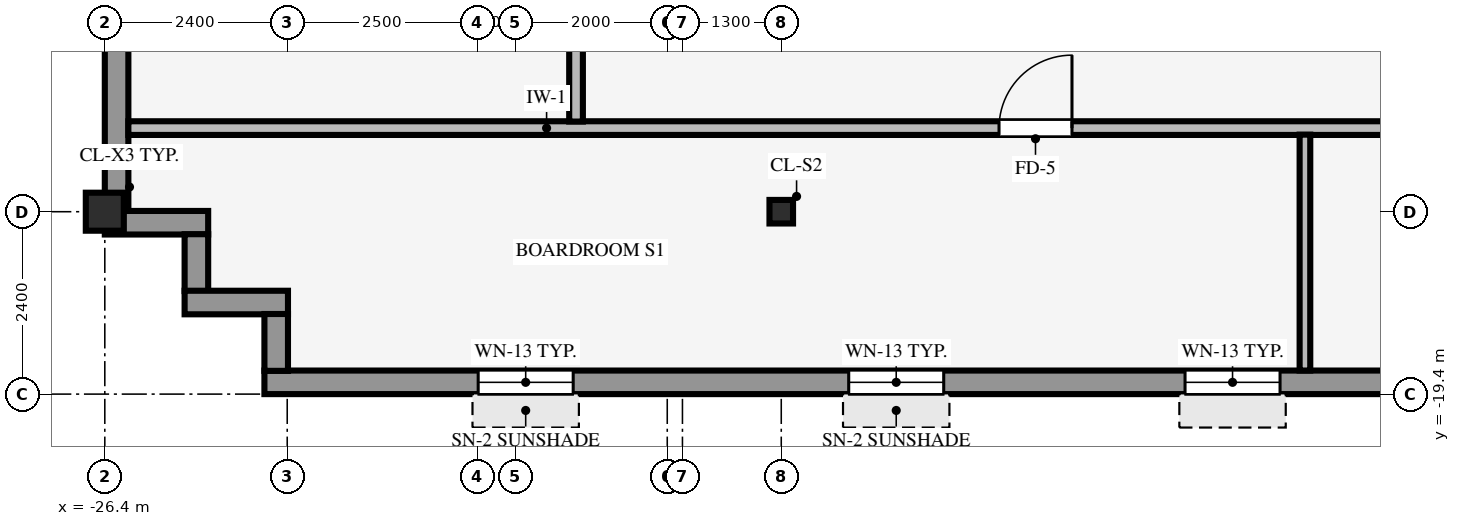
"""IFC4 building model, lengths in metres.
Left out: names, types, materials, properties, quantities, classifications, styles, units other than length and angle.
Written with IfcOpenShell. Run it as: python <this file> out.ifc"""

import sys

from ifc_helpers import new_model, si_unit, direction, frame, frame_2d, origin, origin_2d, place, context, subcontext, project, spatial, rectangle, hollow_rectangle, i_section, extrude, source, transform, mapped, element, fill, save


model = new_model("IFC4")
c1 = context("Model", 3, precision=1e-05, world=origin(), true_north=direction((0.0, 1.0)))
c2 = subcontext(c1, "Body", "Model", "MODEL_VIEW")
j1 = project(units=[si_unit("LENGTHUNIT", "METRE"), si_unit("PLANEANGLEUNIT", "RADIAN")], contexts=[c1])
p1 = place(None, origin())
s1 = spatial("IfcSite", under=j1, at=p1, CompositionType="ELEMENT")
p2 = place(p1, origin())
s2 = spatial("IfcBuilding", under=s1, at=p2, CompositionType="ELEMENT")
p3 = place(p2, frame((0.0, 0.0, 216.45)))
s3 = spatial("IfcBuildingStorey", under=s2, at=p3, CompositionType="ELEMENT", Elevation=216.45)
p4 = place(p3, frame((-26.4, -17.0, 0.0), z_axis=(0.0, 0.0, 1.0), x_axis=(1.0, 0.0, 0.0)))
e1 = element("IfcColumn", 1, at=p4, inside=s3, PredefinedType="COLUMN", context=c2, shape_type="SweptSolid", body=[
    extrude(hollow_rectangle(XDim=0.5, YDim=0.5, WallThickness=0.032, InnerFilletRadius=0.032, OuterFilletRadius=0.064, at=origin_2d()), origin(), (0.0, 0.0, 1.0), 3.37),
])
p5 = place(p3, frame((-17.5, -17.0, 0.0), z_axis=(0.0, 0.0, 1.0), x_axis=(1.0, 0.0, 0.0)))
e2 = element("IfcColumn", 2, at=p5, inside=s3, PredefinedType="COLUMN", context=c2, shape_type="SweptSolid", body=[
    extrude(i_section(OverallWidth=0.31, OverallDepth=0.31, WebThickness=0.015, FlangeThickness=0.015, FilletRadius=0.015, at=origin_2d()), origin(), (0.0, 0.0, 1.0), 3.37),
])
p6 = place(p3, frame((-24.3, -19.245, 0.0), z_axis=(0.0, 0.0, 1.0), x_axis=(1.0, 0.0, 0.0)))
e3 = element("IfcWall", 3, at=p6, inside=s3, PredefinedType="STANDARD", context=c2, shape_type="SweptSolid", body=[
    extrude(rectangle(XDim=41.0, YDim=0.31, at=frame_2d((20.5, 0.0))), origin(), (0.0, 0.0, 1.0), 2.705),
])
p7 = place(p6, frame((2.812, 0.0, 0.8)))
e4 = element("IfcOpeningElement", 4, at=p7, cuts=e3, PredefinedType="OPENING", context=c2, shape_type="SweptSolid", body=[
    extrude(rectangle(XDim=1.25, YDim=1.52, at=frame_2d((0.625, 0.76))), frame((0.0, 0.165, 0.0), z_axis=(0.0, -1.0, 0.0), x_axis=(1.0, 0.0, 0.0)), (0.0, 0.0, 1.0), 0.33),
])
p8 = place(p6, frame((7.688, 0.0, 0.8)))
e5 = element("IfcOpeningElement", 5, at=p8, cuts=e3, PredefinedType="OPENING", context=c2, shape_type="SweptSolid", body=[
    extrude(rectangle(XDim=1.25, YDim=1.52, at=frame_2d((0.625, 0.76))), frame((0.0, 0.165, 0.0), z_axis=(0.0, -1.0, 0.0), x_axis=(1.0, 0.0, 0.0)), (0.0, 0.0, 1.0), 0.33),
])
p9 = place(p6, frame((12.113, 0.0, 0.8)))
e6 = element("IfcOpeningElement", 6, at=p9, cuts=e3, PredefinedType="OPENING", context=c2, shape_type="SweptSolid", body=[
    extrude(rectangle(XDim=1.25, YDim=1.52, at=frame_2d((0.625, 0.76))), frame((0.0, 0.165, 0.0), z_axis=(0.0, -1.0, 0.0), x_axis=(1.0, 0.0, 0.0)), (0.0, 0.0, 1.0), 0.33),
])
p10 = place(p6, frame((17.438, 0.0, 0.8)))
e7 = element("IfcOpeningElement", 7, at=p10, cuts=e3, PredefinedType="OPENING", context=c2, shape_type="SweptSolid", body=[
    extrude(rectangle(XDim=1.25, YDim=1.52, at=frame_2d((0.625, 0.76))), frame((0.0, 0.165, 0.0), z_axis=(0.0, -1.0, 0.0), x_axis=(1.0, 0.0, 0.0)), (0.0, 0.0, 1.0), 0.33),
])
p11 = place(p6, frame((22.312, 0.0, 0.8)))
e8 = element("IfcOpeningElement", 8, at=p11, cuts=e3, PredefinedType="OPENING", context=c2, shape_type="SweptSolid", body=[
    extrude(rectangle(XDim=1.25, YDim=1.52, at=frame_2d((0.625, 0.76))), frame((0.0, 0.165, 0.0), z_axis=(0.0, -1.0, 0.0), x_axis=(1.0, 0.0, 0.0)), (0.0, 0.0, 1.0), 0.33),
])
p12 = place(p6, frame((27.188, 0.0, 0.8)))
e9 = element("IfcOpeningElement", 9, at=p12, cuts=e3, PredefinedType="OPENING", context=c2, shape_type="SweptSolid", body=[
    extrude(rectangle(XDim=1.25, YDim=1.52, at=frame_2d((0.625, 0.76))), frame((0.0, 0.165, 0.0), z_axis=(0.0, -1.0, 0.0), x_axis=(1.0, 0.0, 0.0)), (0.0, 0.0, 1.0), 0.33),
])
p13 = place(p6, frame((31.163, 0.0, 0.8)))
e10 = element("IfcOpeningElement", 10, at=p13, cuts=e3, PredefinedType="OPENING", context=c2, shape_type="SweptSolid", body=[
    extrude(rectangle(XDim=1.25, YDim=1.52, at=frame_2d((0.625, 0.76))), frame((0.0, 0.165, 0.0), z_axis=(0.0, -1.0, 0.0), x_axis=(1.0, 0.0, 0.0)), (0.0, 0.0, 1.0), 0.33),
])
p14 = place(p6, frame((36.938, 0.0, 0.8)))
e11 = element("IfcOpeningElement", 11, at=p14, cuts=e3, PredefinedType="OPENING", context=c2, shape_type="SweptSolid", body=[
    extrude(rectangle(XDim=1.25, YDim=1.52, at=frame_2d((0.625, 0.76))), frame((0.0, 0.165, 0.0), z_axis=(0.0, -1.0, 0.0), x_axis=(1.0, 0.0, 0.0)), (0.0, 0.0, 1.0), 0.33),
])
p15 = place(p3, frame((-26.245, -16.994, 0.0), z_axis=(0.0, 0.0, 1.0), x_axis=(0.0, 1.0, 0.0)))
e12 = element("IfcWall", 12, at=p15, inside=s3, PredefinedType="STANDARD", context=c2, shape_type="SweptSolid", body=[
    extrude(rectangle(XDim=33.988, YDim=0.31, at=frame_2d((16.994, 0.0))), origin(), (0.0, 0.0, 1.0), 2.705),
])
p16 = place(p15, frame((2.26, 0.0, 0.8)))
e13 = element("IfcOpeningElement", 13, at=p16, cuts=e12, PredefinedType="OPENING", context=c2, shape_type="SweptSolid", body=[
    extrude(rectangle(XDim=2.05, YDim=1.52, at=frame_2d((1.025, 0.76))), frame((0.0, 0.165, 0.0), z_axis=(0.0, -1.0, 0.0), x_axis=(1.0, 0.0, 0.0)), (0.0, 0.0, 1.0), 0.33),
])
p17 = place(p15, frame((8.18, 0.0, 0.8)))
e14 = element("IfcOpeningElement", 14, at=p17, cuts=e12, PredefinedType="OPENING", context=c2, shape_type="SweptSolid", body=[
    extrude(rectangle(XDim=2.05, YDim=1.52, at=frame_2d((1.025, 0.76))), frame((0.0, 0.165, 0.0), z_axis=(0.0, -1.0, 0.0), x_axis=(1.0, 0.0, 0.0)), (0.0, 0.0, 1.0), 0.33),
])
p18 = place(p15, frame((10.949, 0.0, 0.8)))
e15 = element("IfcOpeningElement", 15, at=p18, cuts=e12, PredefinedType="OPENING", context=c2, shape_type="SweptSolid", body=[
    extrude(rectangle(XDim=2.05, YDim=1.52, at=frame_2d((1.025, 0.76))), frame((0.0, 0.165, 0.0), z_axis=(0.0, -1.0, 0.0), x_axis=(1.0, 0.0, 0.0)), (0.0, 0.0, 1.0), 0.33),
])
p19 = place(p15, frame((20.539, 0.0, 0.8)))
e16 = element("IfcOpeningElement", 16, at=p19, cuts=e12, PredefinedType="OPENING", context=c2, shape_type="SweptSolid", body=[
    extrude(rectangle(XDim=2.05, YDim=1.52, at=frame_2d((1.025, 0.76))), frame((0.0, 0.165, 0.0), z_axis=(0.0, -1.0, 0.0), x_axis=(1.0, 0.0, 0.0)), (0.0, 0.0, 1.0), 0.33),
])
p20 = place(p15, frame((23.758, 0.0, 0.8)))
e17 = element("IfcOpeningElement", 17, at=p20, cuts=e12, PredefinedType="OPENING", context=c2, shape_type="SweptSolid", body=[
    extrude(rectangle(XDim=2.05, YDim=1.52, at=frame_2d((1.025, 0.76))), frame((0.0, 0.165, 0.0), z_axis=(0.0, -1.0, 0.0), x_axis=(1.0, 0.0, 0.0)), (0.0, 0.0, 1.0), 0.33),
])
p21 = place(p15, frame((29.678, 0.0, 0.8)))
e18 = element("IfcOpeningElement", 18, at=p21, cuts=e12, PredefinedType="OPENING", context=c2, shape_type="SweptSolid", body=[
    extrude(rectangle(XDim=2.05, YDim=1.52, at=frame_2d((1.025, 0.76))), frame((0.0, 0.165, 0.0), z_axis=(0.0, -1.0, 0.0), x_axis=(1.0, 0.0, 0.0)), (0.0, 0.0, 1.0), 0.33),
])
p22 = place(p3, frame((-26.4, -17.145, 0.0), z_axis=(0.0, 0.0, 1.0), x_axis=(1.0, 0.0, 0.0)))
e19 = element("IfcWall", 19, at=p22, inside=s3, PredefinedType="STANDARD", context=c2, shape_type="SweptSolid", body=[
    extrude(rectangle(XDim=1.36, YDim=0.31, at=frame_2d((0.68, 0.0))), origin(), (0.0, 0.0, 1.0), 2.816),
])
p23 = place(p3, frame((-25.195, -18.044, 0.0), z_axis=(0.0, 0.0, 1.0), x_axis=(0.0, 1.0, 0.0)))
e20 = element("IfcWall", 20, at=p23, inside=s3, PredefinedType="STANDARD", context=c2, shape_type="SweptSolid", body=[
    extrude(rectangle(XDim=0.748, YDim=0.31, at=frame_2d((0.374, 0.0))), origin(), (0.0, 0.0, 1.0), 2.816),
])
p24 = place(p3, frame((-25.35, -18.195, 0.0), z_axis=(0.0, 0.0, 1.0), x_axis=(1.0, 0.0, 0.0)))
e21 = element("IfcWall", 21, at=p24, inside=s3, PredefinedType="STANDARD", context=c2, shape_type="SweptSolid", body=[
    extrude(rectangle(XDim=1.36, YDim=0.31, at=frame_2d((0.68, 0.0))), origin(), (0.0, 0.0, 1.0), 2.816),
])
p25 = place(p3, frame((-24.145, -19.094, 0.0), z_axis=(0.0, 0.0, 1.0), x_axis=(0.0, 1.0, 0.0)))
e22 = element("IfcWall", 22, at=p25, inside=s3, PredefinedType="STANDARD", context=c2, shape_type="SweptSolid", body=[
    extrude(rectangle(XDim=0.748, YDim=0.31, at=frame_2d((0.374, 0.0))), origin(), (0.0, 0.0, 1.0), 2.816),
])
p26 = place(p3, frame((-26.09, -15.9, 0.0), z_axis=(0.0, 0.0, 1.0), x_axis=(1.0, 0.0, 0.0)))
e23 = element("IfcWall", 23, at=p26, inside=s3, PredefinedType="PARTITIONING", context=c2, shape_type="SweptSolid", body=[
    extrude(rectangle(XDim=35.09, YDim=0.18, at=frame_2d((17.545, 0.0))), origin(), (0.0, 0.0, 1.0), 3.36),
])
p27 = place(p26, frame((23.605, 0.0, 0.0)))
e24 = element("IfcOpeningElement", 24, at=p27, cuts=e23, PredefinedType="OPENING", context=c2, shape_type="SweptSolid", body=[
    extrude(rectangle(XDim=0.96, YDim=2.1, at=frame_2d((0.48, 1.05))), frame((0.0, 0.1, 0.0), z_axis=(0.0, -1.0, 0.0), x_axis=(1.0, 0.0, 0.0)), (0.0, 0.0, 1.0), 0.2),
])
p28 = place(p26, frame((11.455, 0.0, 0.0)))
e25 = element("IfcOpeningElement", 25, at=p28, cuts=e23, PredefinedType="OPENING", context=c2, shape_type="SweptSolid", body=[
    extrude(rectangle(XDim=0.96, YDim=2.1, at=frame_2d((0.48, 1.05))), frame((0.0, 0.1, 0.0), z_axis=(0.0, -1.0, 0.0), x_axis=(1.0, 0.0, 0.0)), (0.0, 0.0, 1.0), 0.2),
])
p29 = place(p3, frame((-20.2, -15.814, 0.0), z_axis=(0.0, 0.0, 1.0), x_axis=(0.0, 1.0, 0.0)))
e26 = element("IfcWall", 26, at=p29, inside=s3, PredefinedType="PARTITIONING", context=c2, shape_type="SweptSolid", body=[
    extrude(rectangle(XDim=31.628, YDim=0.18, at=frame_2d((15.814, 0.0))), origin(), (0.0, 0.0, 1.0), 3.36),
])
p30 = place(p29, frame((20.334, 0.0, 0.0)))
e27 = element("IfcOpeningElement", 27, at=p30, cuts=e26, PredefinedType="OPENING", context=c2, shape_type="SweptSolid", body=[
    extrude(rectangle(XDim=0.96, YDim=2.1, at=frame_2d((0.48, 1.05))), frame((0.0, 0.1, 0.0), z_axis=(0.0, -1.0, 0.0), x_axis=(1.0, 0.0, 0.0)), (0.0, 0.0, 1.0), 0.2),
])
p31 = place(p29, frame((6.834, 0.0, 0.0)))
e28 = element("IfcOpeningElement", 28, at=p31, cuts=e26, PredefinedType="OPENING", context=c2, shape_type="SweptSolid", body=[
    extrude(rectangle(XDim=0.96, YDim=2.1, at=frame_2d((0.48, 1.05))), frame((0.0, 0.1, 0.0), z_axis=(0.0, -1.0, 0.0), x_axis=(1.0, 0.0, 0.0)), (0.0, 0.0, 1.0), 0.2),
])
p32 = place(p3, frame((-10.61, -19.09, 0.0), z_axis=(0.0, 0.0, 1.0), x_axis=(0.0, 1.0, 0.0)))
e29 = element("IfcWall", 29, at=p32, inside=s3, PredefinedType="PARTITIONING", context=c2, shape_type="SweptSolid", body=[
    extrude(rectangle(XDim=3.104, YDim=0.14, at=frame_2d((1.552, 0.0))), origin(), (0.0, 0.0, 1.0), 3.36),
])
m1 = source(origin(), c2, "Body", "SweptSolid", [
    extrude(rectangle(XDim=1.25, YDim=1.52, at=frame_2d((0.625, 0.76))), frame((0.0, 0.03, 0.0), z_axis=(0.0, -1.0, 0.0), x_axis=(1.0, 0.0, 0.0)), (0.0, 0.0, 1.0), 0.06),
])
p33 = place(p7, origin())
e30 = element("IfcWindow", 30, at=p33, inside=s3, PartitioningType="SINGLE_PANEL", PredefinedType="WINDOW", context=c2, shape_type="MappedRepresentation", body=[
    mapped(m1, transform((0.0, 0.0, 0.0), scale=1.0)),
])
fill(e4, e30)
p34 = place(p8, origin())
e31 = element("IfcWindow", 31, at=p34, inside=s3, PartitioningType="SINGLE_PANEL", PredefinedType="WINDOW", context=c2, shape_type="MappedRepresentation", body=[
    mapped(m1, transform((0.0, 0.0, 0.0), scale=1.0)),
])
fill(e5, e31)
p35 = place(p9, origin())
e32 = element("IfcWindow", 32, at=p35, inside=s3, PartitioningType="SINGLE_PANEL", PredefinedType="WINDOW", context=c2, shape_type="MappedRepresentation", body=[
    mapped(m1, transform((0.0, 0.0, 0.0), scale=1.0)),
])
fill(e6, e32)
m2 = source(origin(), c2, "Body", "SweptSolid", [
    extrude(rectangle(XDim=0.96, YDim=2.1, at=frame_2d((0.48, 1.05))), frame((0.0, 0.025, 0.0), z_axis=(0.0, -1.0, 0.0), x_axis=(1.0, 0.0, 0.0)), (0.0, 0.0, 1.0), 0.05),
])
p36 = place(p28, origin())
e33 = element("IfcDoor", 33, at=p36, inside=s3, OperationType="SINGLE_SWING_RIGHT", PredefinedType="DOOR", context=c2, shape_type="MappedRepresentation", body=[
    mapped(m2, transform((0.0, 0.0, 0.0), scale=1.0)),
])
fill(e25, e33)
save(model, sys.argv[1])
